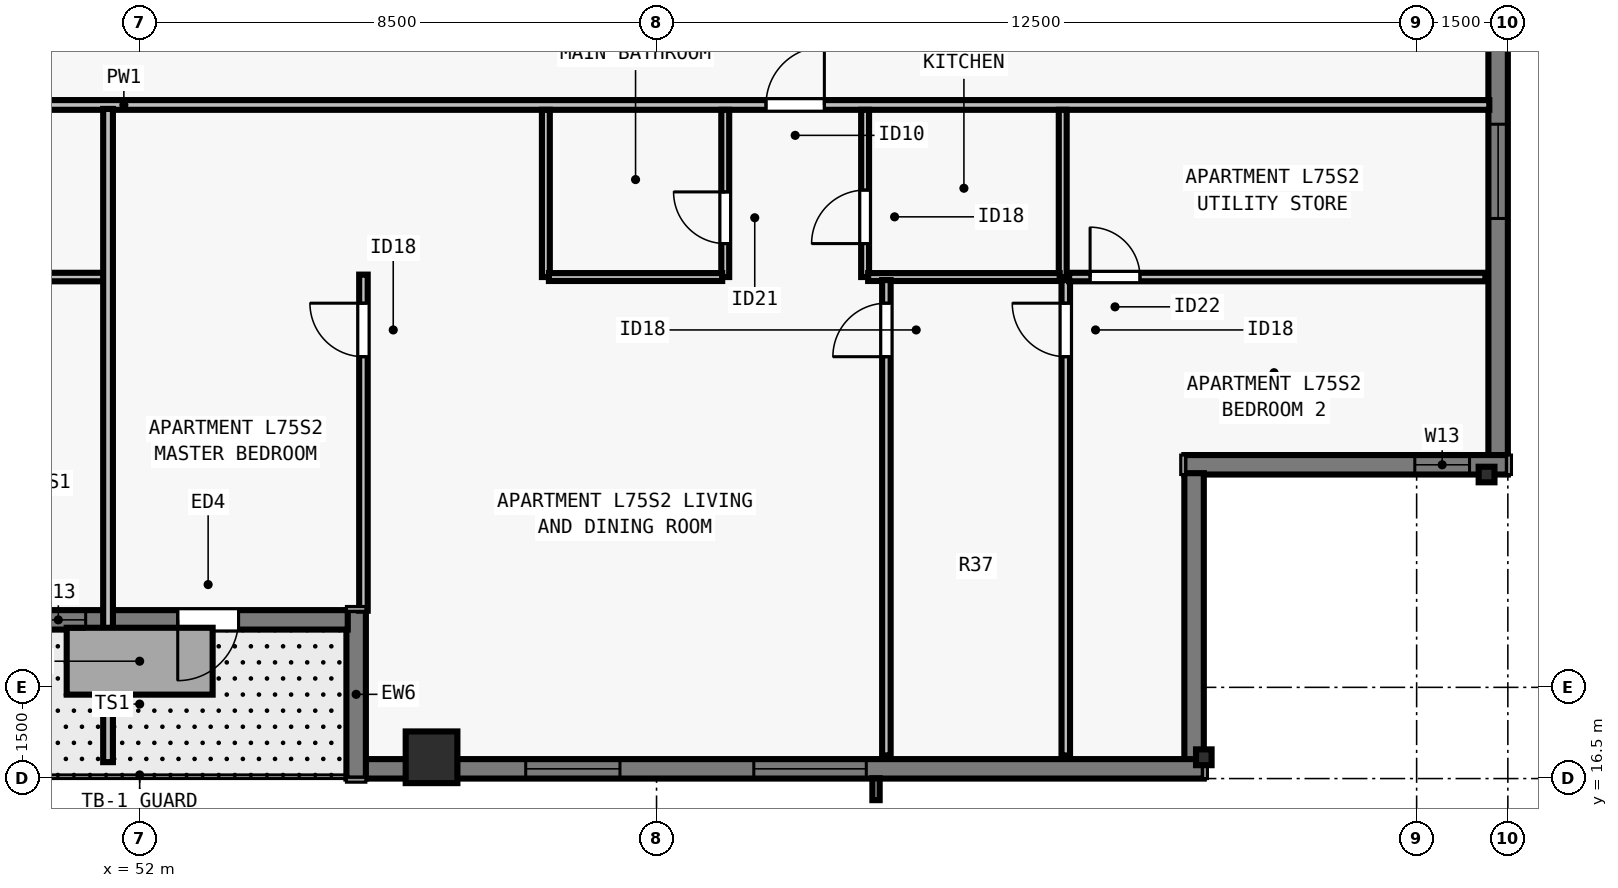
"""IFC4 building model, lengths in metres.
Left out: names, types, materials, properties, quantities, classifications, styles, units other than length and angle.
Written with IfcOpenShell. Run it as: python <this file> out.ifc"""

import sys

from ifc_helpers import new_model, si_unit, direction, frame, frame_2d, origin, origin_2d, place, context, subcontext, project, spatial, rectangle, i_section, extrude, element, fill, save


model = new_model("IFC4")
c1 = context("Model", 3, precision=1e-05, world=origin(), true_north=direction((0.0, 1.0)))
c2 = subcontext(c1, "Body", "Model", "MODEL_VIEW")
j1 = project(units=[si_unit("LENGTHUNIT", "METRE"), si_unit("PLANEANGLEUNIT", "RADIAN")], contexts=[c1])
p1 = place(None, origin())
s1 = spatial("IfcSite", under=j1, at=p1, CompositionType="ELEMENT")
p2 = place(p1, origin())
s2 = spatial("IfcBuilding", under=s1, at=p2, CompositionType="ELEMENT")
p3 = place(p2, frame((0.0, 0.0, 272.5)))
s3 = spatial("IfcBuildingStorey", under=s2, at=p3, CompositionType="ELEMENT", Elevation=272.5)
p4 = place(p3, frame((56.8, 16.85, 0.0), z_axis=(0.0, 0.0, 1.0), x_axis=(1.0, 0.0, 0.0)))
e1 = element("IfcColumn", 1, at=p4, inside=s3, PredefinedType="COLUMN", context=c2, shape_type="SweptSolid", body=[
    extrude(rectangle(XDim=0.85, YDim=0.85, at=origin_2d()), origin(), (0.0, 0.0, 1.0), 3.5),
])
for number, where, z_axis, x_axis in (
    (2, (69.5, 16.85, 0.0), (0.0, 0.0, 1.0), (1.0, 0.0, 0.0)),
    (3, (74.15, 21.5, 0.0), (0.0, 0.0, 1.0), (0.0, 1.0, 0.0)),
):
    element("IfcColumn", number, at=place(p3, frame(where, z_axis=z_axis, x_axis=x_axis)), inside=s3, PredefinedType="COLUMN", context=c2, shape_type="SweptSolid", body=[
        extrude(i_section(OverallWidth=0.256, OverallDepth=0.26, WebThickness=0.01, FlangeThickness=0.017, FilletRadius=0.013, at=origin_2d()), origin(), (0.0, 0.0, 1.0), 3.5),
    ])
p5 = place(p3, frame((74.34, 56.5, 0.0), z_axis=(0.0, 0.0, 1.0), x_axis=(0.0, -1.0, 0.0)))
e4 = element("IfcWall", 4, at=p5, inside=s3, PredefinedType="SOLIDWALL", context=c2, shape_type="SweptSolid", body=[
    extrude(rectangle(XDim=34.702, YDim=0.32, at=frame_2d((17.351, 0.0))), origin(), (0.0, 0.0, 1.0), 3.24),
])
p6 = place(p5, frame((6.888, 0.0, 0.8)))
e5 = element("IfcOpeningElement", 5, at=p6, cuts=e4, PredefinedType="OPENING", context=c2, shape_type="SweptSolid", body=[
    extrude(rectangle(XDim=1.55, YDim=1.628, at=frame_2d((0.775, 0.814))), frame((0.0, 0.17, 0.0), z_axis=(0.0, -1.0, 0.0), x_axis=(1.0, 0.0, 0.0)), (0.0, 0.0, 1.0), 0.34),
])
p7 = place(p5, frame((10.113, 0.0, 0.8)))
e6 = element("IfcOpeningElement", 6, at=p7, cuts=e4, PredefinedType="OPENING", context=c2, shape_type="SweptSolid", body=[
    extrude(rectangle(XDim=1.85, YDim=1.628, at=frame_2d((0.925, 0.814))), frame((0.0, 0.17, 0.0), z_axis=(0.0, -1.0, 0.0), x_axis=(1.0, 0.0, 0.0)), (0.0, 0.0, 1.0), 0.34),
])
p8 = place(p5, frame((14.038, 0.0, 0.8)))
e7 = element("IfcOpeningElement", 7, at=p8, cuts=e4, PredefinedType="OPENING", context=c2, shape_type="SweptSolid", body=[
    extrude(rectangle(XDim=1.55, YDim=1.628, at=frame_2d((0.775, 0.814))), frame((0.0, 0.17, 0.0), z_axis=(0.0, -1.0, 0.0), x_axis=(1.0, 0.0, 0.0)), (0.0, 0.0, 1.0), 0.34),
])
p9 = place(p5, frame((18.114, 0.0, 0.8)))
e8 = element("IfcOpeningElement", 8, at=p9, cuts=e4, PredefinedType="OPENING", context=c2, shape_type="SweptSolid", body=[
    extrude(rectangle(XDim=1.85, YDim=1.628, at=frame_2d((0.925, 0.814))), frame((0.0, 0.17, 0.0), z_axis=(0.0, -1.0, 0.0), x_axis=(1.0, 0.0, 0.0)), (0.0, 0.0, 1.0), 0.34),
])
p10 = place(p5, frame((23.614, 0.0, 0.8)))
e9 = element("IfcOpeningElement", 9, at=p10, cuts=e4, PredefinedType="OPENING", context=c2, shape_type="SweptSolid", body=[
    extrude(rectangle(XDim=1.85, YDim=1.628, at=frame_2d((0.925, 0.814))), frame((0.0, 0.17, 0.0), z_axis=(0.0, -1.0, 0.0), x_axis=(1.0, 0.0, 0.0)), (0.0, 0.0, 1.0), 0.34),
])
p11 = place(p5, frame((29.24, 0.0, 0.8)))
e10 = element("IfcOpeningElement", 10, at=p11, cuts=e4, PredefinedType="OPENING", context=c2, shape_type="SweptSolid", body=[
    extrude(rectangle(XDim=1.55, YDim=1.628, at=frame_2d((0.775, 0.814))), frame((0.0, 0.17, 0.0), z_axis=(0.0, -1.0, 0.0), x_axis=(1.0, 0.0, 0.0)), (0.0, 0.0, 1.0), 0.34),
])
p12 = place(p3, frame((74.5, 21.66, 0.0), z_axis=(0.0, 0.0, 1.0), x_axis=(-1.0, 0.0, 0.0)))
e11 = element("IfcWall", 11, at=p12, inside=s3, PredefinedType="SOLIDWALL", context=c2, shape_type="SweptSolid", body=[
    extrude(rectangle(XDim=5.32, YDim=0.32, at=frame_2d((2.66, 0.0))), origin(), (0.0, 0.0, 1.0), 3.24),
])
p13 = place(p12, frame((0.63, 0.0, 0.8)))
e12 = element("IfcOpeningElement", 12, at=p13, cuts=e11, PredefinedType="OPENING", context=c2, shape_type="SweptSolid", body=[
    extrude(rectangle(XDim=0.9, YDim=1.628, at=frame_2d((0.45, 0.814))), frame((0.0, 0.17, 0.0), z_axis=(0.0, -1.0, 0.0), x_axis=(1.0, 0.0, 0.0)), (0.0, 0.0, 1.0), 0.34),
])
p14 = place(p3, frame((69.34, 21.522, 0.0), z_axis=(0.0, 0.0, 1.0), x_axis=(0.0, -1.0, 0.0)))
e13 = element("IfcWall", 13, at=p14, inside=s3, PredefinedType="SOLIDWALL", context=c2, shape_type="SweptSolid", body=[
    extrude(rectangle(XDim=4.724, YDim=0.32, at=frame_2d((2.362, 0.0))), origin(), (0.0, 0.0, 1.0), 3.24),
])
p15 = place(p3, frame((69.5, 16.66, 0.0), z_axis=(0.0, 0.0, 1.0), x_axis=(-1.0, 0.0, 0.0)))
e14 = element("IfcWall", 14, at=p15, inside=s3, PredefinedType="SOLIDWALL", context=c2, shape_type="SweptSolid", body=[
    extrude(rectangle(XDim=13.802, YDim=0.32, at=frame_2d((6.901, 0.0))), origin(), (0.0, 0.0, 1.0), 3.24),
])
p16 = place(p15, frame((5.551, 0.0, 0.8)))
e15 = element("IfcOpeningElement", 15, at=p16, cuts=e14, PredefinedType="OPENING", context=c2, shape_type="SweptSolid", body=[
    extrude(rectangle(XDim=1.85, YDim=1.628, at=frame_2d((0.925, 0.814))), frame((0.0, 0.17, 0.0), z_axis=(0.0, -1.0, 0.0), x_axis=(1.0, 0.0, 0.0)), (0.0, 0.0, 1.0), 0.34),
])
p17 = place(p15, frame((9.602, 0.0, 0.8)))
e16 = element("IfcOpeningElement", 16, at=p17, cuts=e14, PredefinedType="OPENING", context=c2, shape_type="SweptSolid", body=[
    extrude(rectangle(XDim=1.55, YDim=1.628, at=frame_2d((0.775, 0.814))), frame((0.0, 0.17, 0.0), z_axis=(0.0, -1.0, 0.0), x_axis=(1.0, 0.0, 0.0)), (0.0, 0.0, 1.0), 0.34),
])
p18 = place(p3, frame((55.56, 16.5, 0.0), z_axis=(0.0, 0.0, 1.0), x_axis=(0.0, 1.0, 0.0)))
e17 = element("IfcWall", 17, at=p18, inside=s3, PredefinedType="SOLIDWALL", context=c2, shape_type="SweptSolid", body=[
    extrude(rectangle(XDim=2.77, YDim=0.32, at=frame_2d((1.385, 0.0))), origin(), (0.0, 0.0, 1.0), 3.24),
])
p19 = place(p3, frame((55.422, 19.11, 0.0), z_axis=(0.0, 0.0, 1.0), x_axis=(-1.0, 0.0, 0.0)))
e18 = element("IfcWall", 18, at=p19, inside=s3, PredefinedType="SOLIDWALL", context=c2, shape_type="SweptSolid", body=[
    extrude(rectangle(XDim=7.142, YDim=0.32, at=frame_2d((3.571, 0.0))), origin(), (0.0, 0.0, 1.0), 3.24),
])
p20 = place(p19, frame((1.796, 0.0, 0.0)))
e19 = element("IfcOpeningElement", 19, at=p20, cuts=e18, PredefinedType="OPENING", context=c2, shape_type="SweptSolid", body=[
    extrude(rectangle(XDim=1.0, YDim=2.15, at=frame_2d((0.5, 1.075))), frame((0.0, 0.17, 0.0), z_axis=(0.0, -1.0, 0.0), x_axis=(1.0, 0.0, 0.0)), (0.0, 0.0, 1.0), 0.34),
])
p21 = place(p19, frame((4.31, 0.0, 0.8)))
e20 = element("IfcOpeningElement", 20, at=p21, cuts=e18, PredefinedType="OPENING", context=c2, shape_type="SweptSolid", body=[
    extrude(rectangle(XDim=0.9, YDim=1.628, at=frame_2d((0.45, 0.814))), frame((0.0, 0.17, 0.0), z_axis=(0.0, -1.0, 0.0), x_axis=(1.0, 0.0, 0.0)), (0.0, 0.0, 1.0), 0.34),
])
p22 = place(p3, frame((29.805, 27.577, 0.0), z_axis=(0.0, 0.0, 1.0), x_axis=(1.0, 0.0, 0.0)))
e21 = element("IfcWall", 21, at=p22, inside=s3, PredefinedType="PARTITIONING", context=c2, shape_type="SweptSolid", body=[
    extrude(rectangle(XDim=44.39, YDim=0.16, at=frame_2d((22.195, 0.0))), origin(), (0.0, 0.0, 1.0), 2.908),
])
p23 = place(p22, frame((10.415, 0.0, 0.0)))
e22 = element("IfcOpeningElement", 22, at=p23, cuts=e21, PredefinedType="OPENING", context=c2, shape_type="SweptSolid", body=[
    extrude(rectangle(XDim=0.96, YDim=2.18, at=frame_2d((0.48, 1.09))), frame((0.0, 0.09, 0.0), z_axis=(0.0, -1.0, 0.0), x_axis=(1.0, 0.0, 0.0)), (0.0, 0.0, 1.0), 0.18),
])
p24 = place(p22, frame((32.495, 0.0, 0.0)))
e23 = element("IfcOpeningElement", 23, at=p24, cuts=e21, PredefinedType="OPENING", context=c2, shape_type="SweptSolid", body=[
    extrude(rectangle(XDim=0.96, YDim=2.18, at=frame_2d((0.48, 1.09))), frame((0.0, 0.09, 0.0), z_axis=(0.0, -1.0, 0.0), x_axis=(1.0, 0.0, 0.0)), (0.0, 0.0, 1.0), 0.18),
])
p25 = place(p3, frame((45.15, 24.748, 0.0), z_axis=(0.0, 0.0, 1.0), x_axis=(1.0, 0.0, 0.0)))
e24 = element("IfcWall", 24, at=p25, inside=s3, PredefinedType="PARTITIONING", context=c2, shape_type="SweptSolid", body=[
    extrude(rectangle(XDim=6.38, YDim=0.14, at=frame_2d((3.19, 0.0))), origin(), (0.0, 0.0, 1.0), 3.24),
])
p26 = place(p25, frame((0.4, 0.0, 0.0)))
e25 = element("IfcOpeningElement", 25, at=p26, cuts=e24, PredefinedType="OPENING", context=c2, shape_type="SweptSolid", body=[
    extrude(rectangle(XDim=0.82, YDim=2.1, at=frame_2d((0.41, 1.05))), frame((0.0, 0.08, 0.0), z_axis=(0.0, -1.0, 0.0), x_axis=(1.0, 0.0, 0.0)), (0.0, 0.0, 1.0), 0.16),
])
p27 = place(p3, frame((51.48, 16.77, 0.0), z_axis=(0.0, 0.0, 1.0), x_axis=(0.0, 1.0, 0.0)))
e26 = element("IfcWall", 26, at=p27, inside=s3, PredefinedType="PARTITIONING", context=c2, shape_type="SweptSolid", body=[
    extrude(rectangle(XDim=10.742, YDim=0.16, at=frame_2d((5.371, 0.0))), origin(), (0.0, 0.0, 1.0), 2.908),
])
p28 = place(p3, frame((58.68, 24.748, 0.0), z_axis=(0.0, 0.0, 1.0), x_axis=(0.0, 1.0, 0.0)))
e27 = element("IfcWall", 27, at=p28, inside=s3, PredefinedType="PLUMBINGWALL", context=c2, shape_type="SweptSolid", body=[
    extrude(rectangle(XDim=2.75, YDim=0.13, at=frame_2d((1.375, 0.0))), origin(), (0.0, 0.0, 1.0), 3.24),
])
p29 = place(p3, frame((61.63, 24.748, 0.0), z_axis=(0.0, 0.0, 1.0), x_axis=(0.0, 1.0, 0.0)))
e28 = element("IfcWall", 28, at=p29, inside=s3, PredefinedType="PLUMBINGWALL", context=c2, shape_type="SweptSolid", body=[
    extrude(rectangle(XDim=2.75, YDim=0.13, at=frame_2d((1.375, 0.0))), origin(), (0.0, 0.0, 1.0), 3.24),
])
p30 = place(p29, frame((0.55, 0.0, 0.0)))
e29 = element("IfcOpeningElement", 29, at=p30, cuts=e28, PredefinedType="OPENING", context=c2, shape_type="SweptSolid", body=[
    extrude(rectangle(XDim=0.85, YDim=2.08, at=frame_2d((0.425, 1.04))), frame((0.0, 0.075, 0.0), z_axis=(0.0, -1.0, 0.0), x_axis=(1.0, 0.0, 0.0)), (0.0, 0.0, 1.0), 0.15),
])
p31 = place(p3, frame((58.73, 24.748, 0.0), z_axis=(0.0, 0.0, 1.0), x_axis=(1.0, 0.0, 0.0)))
e30 = element("IfcWall", 30, at=p31, inside=s3, PredefinedType="PLUMBINGWALL", context=c2, shape_type="SweptSolid", body=[
    extrude(rectangle(XDim=2.85, YDim=0.13, at=frame_2d((1.425, 0.0))), origin(), (0.0, 0.0, 1.0), 3.24),
])
p32 = place(p3, frame((67.18, 24.748, 0.0), z_axis=(0.0, 0.0, 1.0), x_axis=(0.0, 1.0, 0.0)))
e31 = element("IfcWall", 31, at=p32, inside=s3, PredefinedType="PLUMBINGWALL", context=c2, shape_type="SweptSolid", body=[
    extrude(rectangle(XDim=2.75, YDim=0.13, at=frame_2d((1.375, 0.0))), origin(), (0.0, 0.0, 1.0), 3.24),
])
p33 = place(p3, frame((63.93, 24.748, 0.0), z_axis=(0.0, 0.0, 1.0), x_axis=(0.0, 1.0, 0.0)))
e32 = element("IfcWall", 32, at=p33, inside=s3, PredefinedType="PLUMBINGWALL", context=c2, shape_type="SweptSolid", body=[
    extrude(rectangle(XDim=2.75, YDim=0.13, at=frame_2d((1.375, 0.0))), origin(), (0.0, 0.0, 1.0), 2.523),
])
p34 = place(p33, frame((0.55, 0.0, 0.0)))
e33 = element("IfcOpeningElement", 33, at=p34, cuts=e32, PredefinedType="OPENING", context=c2, shape_type="SweptSolid", body=[
    extrude(rectangle(XDim=0.88, YDim=2.1, at=frame_2d((0.44, 1.05))), frame((0.0, 0.075, 0.0), z_axis=(0.0, -1.0, 0.0), x_axis=(1.0, 0.0, 0.0)), (0.0, 0.0, 1.0), 0.15),
])
p35 = place(p3, frame((63.98, 24.748, 0.0), z_axis=(0.0, 0.0, 1.0), x_axis=(1.0, 0.0, 0.0)))
e34 = element("IfcWall", 34, at=p35, inside=s3, PredefinedType="PLUMBINGWALL", context=c2, shape_type="SweptSolid", body=[
    extrude(rectangle(XDim=3.15, YDim=0.13, at=frame_2d((1.575, 0.0))), origin(), (0.0, 0.0, 1.0), 3.24),
])
p36 = place(p3, frame((55.68, 19.26, 0.0), z_axis=(0.0, 0.0, 1.0), x_axis=(0.0, 1.0, 0.0)))
e35 = element("IfcWall", 35, at=p36, inside=s3, PredefinedType="PARTITIONING", context=c2, shape_type="SweptSolid", body=[
    extrude(rectangle(XDim=5.528, YDim=0.14, at=frame_2d((2.764, 0.0))), origin(), (0.0, 0.0, 1.0), 3.24),
])
p37 = place(p36, frame((4.177, 0.0, 0.0)))
e36 = element("IfcOpeningElement", 36, at=p37, cuts=e35, PredefinedType="OPENING", context=c2, shape_type="SweptSolid", body=[
    extrude(rectangle(XDim=0.88, YDim=2.1, at=frame_2d((0.44, 1.05))), frame((0.0, 0.08, 0.0), z_axis=(0.0, -1.0, 0.0), x_axis=(1.0, 0.0, 0.0)), (0.0, 0.0, 1.0), 0.16),
])
p38 = place(p3, frame((67.23, 16.88, 0.0), z_axis=(0.0, 0.0, 1.0), x_axis=(0.0, 1.0, 0.0)))
e37 = element("IfcWall", 37, at=p38, inside=s3, PredefinedType="PARTITIONING", context=c2, shape_type="SweptSolid", body=[
    extrude(rectangle(XDim=7.818, YDim=0.14, at=frame_2d((3.909, 0.0))), origin(), (0.0, 0.0, 1.0), 2.523),
])
p39 = place(p38, frame((6.558, 0.0, 0.0)))
e38 = element("IfcOpeningElement", 38, at=p39, cuts=e37, PredefinedType="OPENING", context=c2, shape_type="SweptSolid", body=[
    extrude(rectangle(XDim=0.88, YDim=2.1, at=frame_2d((0.44, 1.05))), frame((0.0, 0.08, 0.0), z_axis=(0.0, -1.0, 0.0), x_axis=(1.0, 0.0, 0.0)), (0.0, 0.0, 1.0), 0.16),
])
p40 = place(p3, frame((67.285, 24.748, 0.0), z_axis=(0.0, 0.0, 1.0), x_axis=(1.0, 0.0, 0.0)))
e39 = element("IfcWall", 39, at=p40, inside=s3, PredefinedType="PARTITIONING", context=c2, shape_type="SweptSolid", body=[
    extrude(rectangle(XDim=6.845, YDim=0.14, at=frame_2d((3.422, 0.0))), origin(), (0.0, 0.0, 1.0), 2.908),
])
p41 = place(p40, frame((0.345, 0.0, 0.0)))
e40 = element("IfcOpeningElement", 40, at=p41, cuts=e39, PredefinedType="OPENING", context=c2, shape_type="SweptSolid", body=[
    extrude(rectangle(XDim=0.82, YDim=2.1, at=frame_2d((0.41, 1.05))), frame((0.0, 0.08, 0.0), z_axis=(0.0, -1.0, 0.0), x_axis=(1.0, 0.0, 0.0)), (0.0, 0.0, 1.0), 0.16),
])
p42 = place(p3, frame((64.28, 16.88, 0.0), z_axis=(0.0, 0.0, 1.0), x_axis=(0.0, 1.0, 0.0)))
e41 = element("IfcWall", 41, at=p42, inside=s3, PredefinedType="PARTITIONING", context=c2, shape_type="SweptSolid", body=[
    extrude(rectangle(XDim=7.818, YDim=0.14, at=frame_2d((3.909, 0.0))), origin(), (0.0, 0.0, 1.0), 2.523),
])
p43 = place(p42, frame((6.558, 0.0, 0.0)))
e42 = element("IfcOpeningElement", 42, at=p43, cuts=e41, PredefinedType="OPENING", context=c2, shape_type="SweptSolid", body=[
    extrude(rectangle(XDim=0.88, YDim=2.1, at=frame_2d((0.44, 1.05))), frame((0.0, 0.08, 0.0), z_axis=(0.0, -1.0, 0.0), x_axis=(1.0, 0.0, 0.0)), (0.0, 0.0, 1.0), 0.16),
])
p44 = place(p11, origin())
e43 = element("IfcWindow", 43, at=p44, inside=s3, PartitioningType="SINGLE_PANEL", PredefinedType="WINDOW", context=c2, shape_type="SweptSolid", body=[
    extrude(rectangle(XDim=1.55, YDim=1.628, at=frame_2d((0.775, 0.814))), frame((0.0, -0.05, 0.0), z_axis=(0.0, -1.0, 0.0), x_axis=(1.0, 0.0, 0.0)), (0.0, 0.0, 1.0), 0.06),
])
fill(e10, e43)
p45 = place(p16, origin())
e44 = element("IfcWindow", 44, at=p45, inside=s3, PartitioningType="SINGLE_PANEL", PredefinedType="WINDOW", context=c2, shape_type="SweptSolid", body=[
    extrude(rectangle(XDim=1.85, YDim=1.628, at=frame_2d((0.925, 0.814))), frame((0.0, -0.05, 0.0), z_axis=(0.0, -1.0, 0.0), x_axis=(1.0, 0.0, 0.0)), (0.0, 0.0, 1.0), 0.06),
])
fill(e15, e44)
p46 = place(p17, origin())
e45 = element("IfcWindow", 45, at=p46, inside=s3, PartitioningType="SINGLE_PANEL", PredefinedType="WINDOW", context=c2, shape_type="SweptSolid", body=[
    extrude(rectangle(XDim=1.55, YDim=1.628, at=frame_2d((0.775, 0.814))), frame((0.0, -0.05, 0.0), z_axis=(0.0, -1.0, 0.0), x_axis=(1.0, 0.0, 0.0)), (0.0, 0.0, 1.0), 0.06),
])
fill(e16, e45)
p47 = place(p20, origin())
e46 = element("IfcDoor", 46, at=p47, inside=s3, OperationType="SINGLE_SWING_RIGHT", PredefinedType="DOOR", context=c2, shape_type="SweptSolid", body=[
    extrude(rectangle(XDim=1.0, YDim=2.15, at=frame_2d((0.5, 1.075))), frame((0.0, 0.025, 0.0), z_axis=(0.0, -1.0, 0.0), x_axis=(1.0, 0.0, 0.0)), (0.0, 0.0, 1.0), 0.05),
])
fill(e19, e46)
p48 = place(p21, origin())
e47 = element("IfcWindow", 47, at=p48, inside=s3, PartitioningType="SINGLE_PANEL", PredefinedType="WINDOW", context=c2, shape_type="SweptSolid", body=[
    extrude(rectangle(XDim=0.9, YDim=1.628, at=frame_2d((0.45, 0.814))), frame((0.0, -0.04, 0.0), z_axis=(0.0, -1.0, 0.0), x_axis=(1.0, 0.0, 0.0)), (0.0, 0.0, 1.0), 0.06),
])
fill(e20, e47)
p49 = place(p13, origin())
e48 = element("IfcWindow", 48, at=p49, inside=s3, PartitioningType="SINGLE_PANEL", PredefinedType="WINDOW", context=c2, shape_type="SweptSolid", body=[
    extrude(rectangle(XDim=0.9, YDim=1.628, at=frame_2d((0.45, 0.814))), frame((0.0, -0.04, 0.0), z_axis=(0.0, -1.0, 0.0), x_axis=(1.0, 0.0, 0.0)), (0.0, 0.0, 1.0), 0.06),
])
fill(e12, e48)
p50 = place(p30, origin())
e49 = element("IfcDoor", 49, at=p50, inside=s3, OperationType="SINGLE_SWING_RIGHT", PredefinedType="DOOR", context=c2, shape_type="SweptSolid", body=[
    extrude(rectangle(XDim=0.85, YDim=2.08, at=frame_2d((0.425, 1.04))), frame((0.0, 0.025, 0.0), z_axis=(0.0, -1.0, 0.0), x_axis=(1.0, 0.0, 0.0)), (0.0, 0.0, 1.0), 0.05),
])
fill(e29, e49)
p51 = place(p34, origin())
e50 = element("IfcDoor", 50, at=p51, inside=s3, OperationType="SINGLE_SWING_LEFT", PredefinedType="DOOR", context=c2, shape_type="SweptSolid", body=[
    extrude(rectangle(XDim=0.88, YDim=2.1, at=frame_2d((0.44, 1.05))), frame((0.0, 0.025, 0.0), z_axis=(0.0, -1.0, 0.0), x_axis=(1.0, 0.0, 0.0)), (0.0, 0.0, 1.0), 0.05),
])
fill(e33, e50)
p52 = place(p37, origin())
e51 = element("IfcDoor", 51, at=p52, inside=s3, OperationType="SINGLE_SWING_RIGHT", PredefinedType="DOOR", context=c2, shape_type="SweptSolid", body=[
    extrude(rectangle(XDim=0.88, YDim=2.1, at=frame_2d((0.44, 1.05))), frame((0.0, 0.025, 0.0), z_axis=(0.0, -1.0, 0.0), x_axis=(1.0, 0.0, 0.0)), (0.0, 0.0, 1.0), 0.05),
])
fill(e36, e51)
p53 = place(p41, origin())
e52 = element("IfcDoor", 52, at=p53, inside=s3, OperationType="SINGLE_SWING_LEFT", PredefinedType="DOOR", context=c2, shape_type="SweptSolid", body=[
    extrude(rectangle(XDim=0.82, YDim=2.1, at=frame_2d((0.41, 1.05))), frame((0.0, 0.025, 0.0), z_axis=(0.0, -1.0, 0.0), x_axis=(1.0, 0.0, 0.0)), (0.0, 0.0, 1.0), 0.05),
])
fill(e40, e52)
p54 = place(p39, origin())
e53 = element("IfcDoor", 53, at=p54, inside=s3, OperationType="SINGLE_SWING_RIGHT", PredefinedType="DOOR", context=c2, shape_type="SweptSolid", body=[
    extrude(rectangle(XDim=0.88, YDim=2.1, at=frame_2d((0.44, 1.05))), frame((0.0, 0.025, 0.0), z_axis=(0.0, -1.0, 0.0), x_axis=(1.0, 0.0, 0.0)), (0.0, 0.0, 1.0), 0.05),
])
fill(e38, e53)
p55 = place(p43, origin())
e54 = element("IfcDoor", 54, at=p55, inside=s3, OperationType="SINGLE_SWING_LEFT", PredefinedType="DOOR", context=c2, shape_type="SweptSolid", body=[
    extrude(rectangle(XDim=0.88, YDim=2.1, at=frame_2d((0.44, 1.05))), frame((0.0, 0.025, 0.0), z_axis=(0.0, -1.0, 0.0), x_axis=(1.0, 0.0, 0.0)), (0.0, 0.0, 1.0), 0.05),
])
fill(e42, e54)
p56 = place(p24, origin())
e55 = element("IfcDoor", 55, at=p56, inside=s3, OperationType="SINGLE_SWING_RIGHT", PredefinedType="DOOR", context=c2, shape_type="SweptSolid", body=[
    extrude(rectangle(XDim=0.96, YDim=2.18, at=frame_2d((0.48, 1.09))), frame((0.0, 0.025, 0.0), z_axis=(0.0, -1.0, 0.0), x_axis=(1.0, 0.0, 0.0)), (0.0, 0.0, 1.0), 0.05),
])
fill(e23, e55)
save(model, sys.argv[1])
